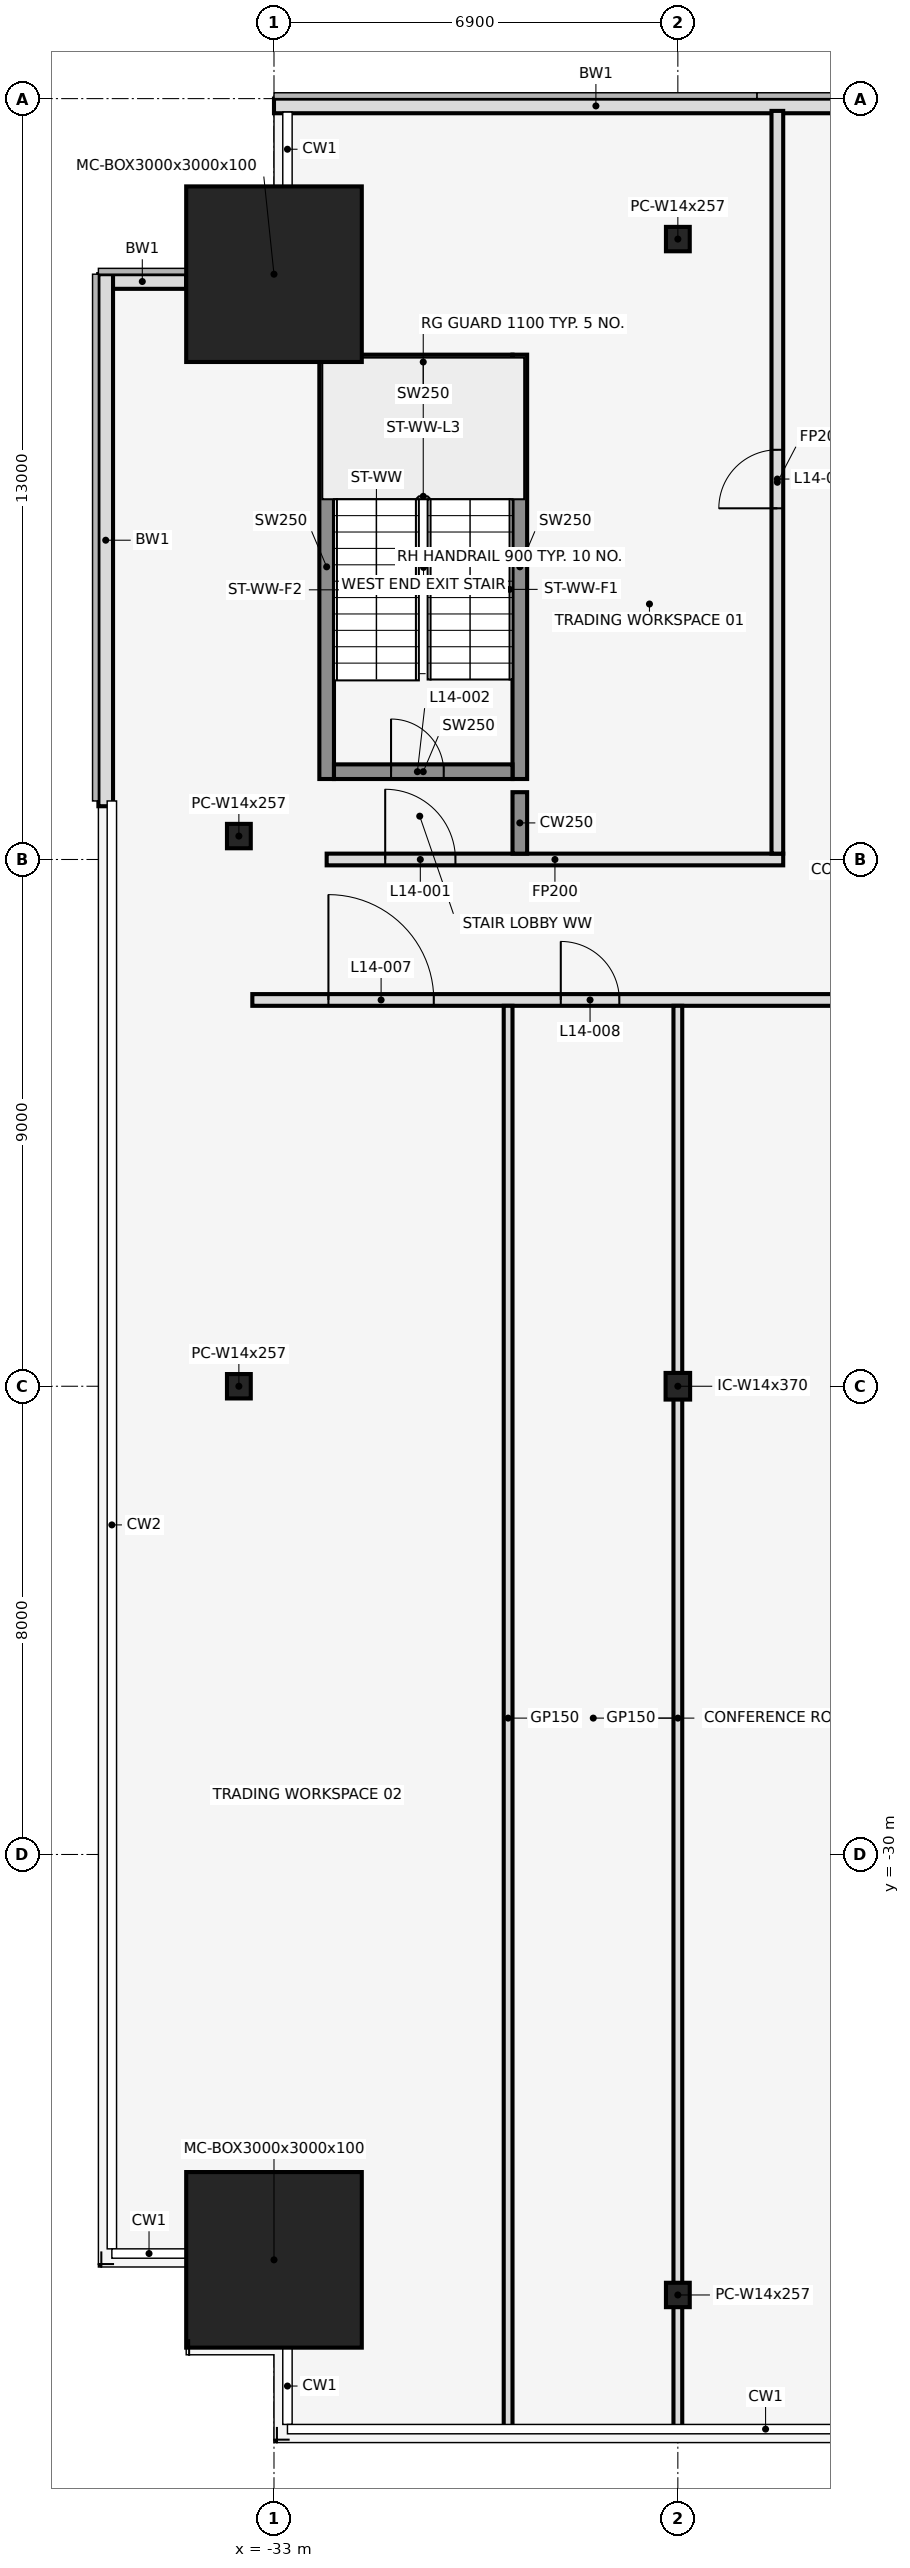
"""IFC4 building model, lengths in metres.
Left out: names, types, materials, properties, quantities, classifications, styles, units other than length and angle.
Written with IfcOpenShell. Run it as: python <this file> out.ifc"""

import sys

from ifc_helpers import new_model, si_unit, direction, frame, frame_2d, origin, origin_2d, place, context, subcontext, project, spatial, rectangle, hollow_rectangle, i_section, extrude, element, fill, save


model = new_model("IFC4")
c1 = context("Model", 3, precision=1e-05, world=origin(), true_north=direction((0.0, 1.0)))
c2 = subcontext(c1, "Body", "Model", "MODEL_VIEW")
j1 = project(units=[si_unit("LENGTHUNIT", "METRE"), si_unit("PLANEANGLEUNIT", "RADIAN")], contexts=[c1])
p1 = place(None, origin())
s1 = spatial("IfcSite", under=j1, at=p1, CompositionType="ELEMENT")
p2 = place(p1, origin())
s2 = spatial("IfcBuilding", under=s1, at=p2, CompositionType="ELEMENT")
p3 = place(p2, frame((0.0, 0.0, 71.0)))
s3 = spatial("IfcBuildingStorey", under=s2, at=p3, CompositionType="ELEMENT", Elevation=71.0)
for number, where, z_axis, x_axis in (
    (1, (-33.0, -36.926, 0.0), (0.0, 0.0, 1.0), (1.0, 0.0, 0.0)),
    (2, (-33.0, -3.0, 0.0), (0.0, 0.0, 1.0), (1.0, 0.0, 0.0)),
):
    element("IfcColumn", number, at=place(p3, frame(where, z_axis=z_axis, x_axis=x_axis)), inside=s3, PredefinedType="COLUMN", context=c2, shape_type="SweptSolid", body=[
        extrude(hollow_rectangle(XDim=3.0, YDim=3.0, WallThickness=0.1, at=origin_2d()), origin(), (0.0, 0.0, 1.0), 4.5),
    ])
for number, where, z_axis, x_axis in (
    (3, (-26.1, -37.526, 0.0), (0.0, 0.0, 1.0), (1.0, 0.0, 0.0)),
    (4, (-26.1, -2.4, 0.0), (0.0, 0.0, 1.0), (1.0, 0.0, 0.0)),
    (5, (-33.6, -12.6, 0.0), (0.0, 0.0, 1.0), (1.0, 0.0, 0.0)),
    (6, (-33.6, -22.0, 0.0), (0.0, 0.0, 1.0), (1.0, 0.0, 0.0)),
):
    element("IfcColumn", number, at=place(p3, frame(where, z_axis=z_axis, x_axis=x_axis)), inside=s3, PredefinedType="COLUMN", context=c2, shape_type="SweptSolid", body=[
        extrude(i_section(OverallWidth=0.406, OverallDepth=0.417, WebThickness=0.03, FlangeThickness=0.048, at=origin_2d()), origin(), (0.0, 0.0, 1.0), 4.5),
    ])
p4 = place(p3, frame((-26.1, -22.0, 0.0), z_axis=(0.0, 0.0, 1.0), x_axis=(1.0, 0.0, 0.0)))
e7 = element("IfcColumn", 7, at=p4, inside=s3, PredefinedType="COLUMN", context=c2, shape_type="SweptSolid", body=[
    extrude(i_section(OverallWidth=0.419, OverallDepth=0.455, WebThickness=0.042, FlangeThickness=0.068, at=origin_2d()), origin(), (0.0, 0.0, 1.0), 4.5),
])
p5 = place(p3, frame((-22.0, -0.125, 0.0), z_axis=(0.0, 0.0, 1.0), x_axis=(-1.0, 0.0, 0.0)))
e8 = element("IfcWall", 8, at=p5, inside=s3, PredefinedType="STANDARD", context=c2, shape_type="SweptSolid", body=[
    extrude(rectangle(XDim=11.0, YDim=0.25, at=frame_2d((5.5, 0.0))), origin(), (0.0, 0.0, 1.0), 4.35),
])
p6 = place(p3, frame((-34.5, -3.125, 0.0), z_axis=(0.0, 0.0, 1.0), x_axis=(-1.0, 0.0, 0.0)))
e9 = element("IfcWall", 9, at=p6, inside=s3, PredefinedType="STANDARD", context=c2, shape_type="SweptSolid", body=[
    extrude(rectangle(XDim=1.5, YDim=0.25, at=frame_2d((0.75, 0.0))), origin(), (0.0, 0.0, 1.0), 4.35),
])
p7 = place(p3, frame((-35.875, -3.0, 0.0), z_axis=(0.0, 0.0, 1.0), x_axis=(0.0, -1.0, 0.0)))
e10 = element("IfcWall", 10, at=p7, inside=s3, PredefinedType="STANDARD", context=c2, shape_type="SweptSolid", body=[
    extrude(rectangle(XDim=9.09, YDim=0.25, at=frame_2d((4.545, 0.0))), origin(), (0.0, 0.0, 1.0), 4.35),
])
for number, where, z_axis, x_axis in (
    (11, (-32.1, -11.625, 0.0), (0.0, 0.0, 1.0), (0.0, 1.0, 0.0)),
    (12, (-28.8, -11.625, 0.0), (0.0, 0.0, 1.0), (0.0, 1.0, 0.0)),
):
    element("IfcWall", number, at=place(p3, frame(where, z_axis=z_axis, x_axis=x_axis)), inside=s3, PredefinedType="SHEAR", context=c2, shape_type="SweptSolid", body=[
        extrude(rectangle(XDim=7.25, YDim=0.25, at=frame_2d((3.625, 0.0))), origin(), (0.0, 0.0, 1.0), 4.5),
    ])
p8 = place(p3, frame((-31.975, -11.5, 0.0), z_axis=(0.0, 0.0, 1.0), x_axis=(1.0, 0.0, 0.0)))
e13 = element("IfcWall", 13, at=p8, inside=s3, PredefinedType="SHEAR", context=c2, shape_type="SweptSolid", body=[
    extrude(rectangle(XDim=3.05, YDim=0.25, at=frame_2d((1.525, 0.0))), origin(), (0.0, 0.0, 1.0), 4.5),
])
p9 = place(p8, frame((0.975, 0.0, 0.0)))
e14 = element("IfcOpeningElement", 14, at=p9, cuts=e13, PredefinedType="OPENING", context=c2, shape_type="SweptSolid", body=[
    extrude(rectangle(XDim=0.9, YDim=2.1, at=frame_2d((0.45, 1.05))), frame((0.0, 0.137, 0.0), z_axis=(0.0, -1.0, 0.0), x_axis=(1.0, 0.0, 0.0)), (0.0, 0.0, 1.0), 0.274),
])
p10 = place(p3, frame((-31.975, -4.5, 0.0), z_axis=(0.0, 0.0, 1.0), x_axis=(1.0, 0.0, 0.0)))
e15 = element("IfcWall", 15, at=p10, inside=s3, PredefinedType="SHEAR", context=c2, shape_type="SweptSolid", body=[
    extrude(rectangle(XDim=3.05, YDim=0.25, at=frame_2d((1.525, 0.0))), origin(), (0.0, 0.0, 1.0), 4.5),
])
p11 = place(p3, frame((-33.37, -15.4, 0.0), z_axis=(0.0, 0.0, 1.0), x_axis=(1.0, 0.0, 0.0)))
e16 = element("IfcWall", 16, at=p11, inside=s3, PredefinedType="PARTITIONING", context=c2, shape_type="SweptSolid", body=[
    extrude(rectangle(XDim=66.74, YDim=0.2, at=frame_2d((33.37, 0.0))), origin(), (0.0, 0.0, 1.0), 3.418),
])
p12 = place(p11, frame((1.3, 0.0, 0.0)))
e17 = element("IfcOpeningElement", 17, at=p12, cuts=e16, PredefinedType="OPENING", context=c2, shape_type="SweptSolid", body=[
    extrude(rectangle(XDim=1.8, YDim=2.1, at=frame_2d((0.9, 1.05))), frame((0.0, 0.112, 0.0), z_axis=(0.0, -1.0, 0.0), x_axis=(1.0, 0.0, 0.0)), (0.0, 0.0, 1.0), 0.224),
])
p13 = place(p11, frame((5.27, 0.0, 0.0)))
e18 = element("IfcOpeningElement", 18, at=p13, cuts=e16, PredefinedType="OPENING", context=c2, shape_type="SweptSolid", body=[
    extrude(rectangle(XDim=1.0, YDim=2.1, at=frame_2d((0.5, 1.05))), frame((0.0, 0.112, 0.0), z_axis=(0.0, -1.0, 0.0), x_axis=(1.0, 0.0, 0.0)), (0.0, 0.0, 1.0), 0.224),
])
p14 = place(p11, frame((10.77, 0.0, 0.0)))
e19 = element("IfcOpeningElement", 19, at=p14, cuts=e16, PredefinedType="OPENING", context=c2, shape_type="SweptSolid", body=[
    extrude(rectangle(XDim=1.8, YDim=2.1, at=frame_2d((0.9, 1.05))), frame((0.0, 0.112, 0.0), z_axis=(0.0, -1.0, 0.0), x_axis=(1.0, 0.0, 0.0)), (0.0, 0.0, 1.0), 0.224),
])
p15 = place(p11, frame((16.87, 0.0, 0.0)))
e20 = element("IfcOpeningElement", 20, at=p15, cuts=e16, PredefinedType="OPENING", context=c2, shape_type="SweptSolid", body=[
    extrude(rectangle(XDim=1.0, YDim=2.1, at=frame_2d((0.5, 1.05))), frame((0.0, 0.112, 0.0), z_axis=(0.0, -1.0, 0.0), x_axis=(1.0, 0.0, 0.0)), (0.0, 0.0, 1.0), 0.224),
])
p16 = place(p11, frame((22.27, 0.0, 0.0)))
e21 = element("IfcOpeningElement", 21, at=p16, cuts=e16, PredefinedType="OPENING", context=c2, shape_type="SweptSolid", body=[
    extrude(rectangle(XDim=1.8, YDim=2.1, at=frame_2d((0.9, 1.05))), frame((0.0, 0.112, 0.0), z_axis=(0.0, -1.0, 0.0), x_axis=(1.0, 0.0, 0.0)), (0.0, 0.0, 1.0), 0.224),
])
p17 = place(p11, frame((33.87, 0.0, 0.0)))
e22 = element("IfcOpeningElement", 22, at=p17, cuts=e16, PredefinedType="OPENING", context=c2, shape_type="SweptSolid", body=[
    extrude(rectangle(XDim=1.8, YDim=2.1, at=frame_2d((0.9, 1.05))), frame((0.0, 0.112, 0.0), z_axis=(0.0, -1.0, 0.0), x_axis=(1.0, 0.0, 0.0)), (0.0, 0.0, 1.0), 0.224),
])
p18 = place(p11, frame((45.97, 0.0, 0.0)))
e23 = element("IfcOpeningElement", 23, at=p18, cuts=e16, PredefinedType="OPENING", context=c2, shape_type="SweptSolid", body=[
    extrude(rectangle(XDim=0.9, YDim=2.1, at=frame_2d((0.45, 1.05))), frame((0.0, 0.112, 0.0), z_axis=(0.0, -1.0, 0.0), x_axis=(1.0, 0.0, 0.0)), (0.0, 0.0, 1.0), 0.224),
])
p19 = place(p11, frame((55.67, 0.0, 0.0)))
e24 = element("IfcOpeningElement", 24, at=p19, cuts=e16, PredefinedType="OPENING", context=c2, shape_type="SweptSolid", body=[
    extrude(rectangle(XDim=1.8, YDim=2.1, at=frame_2d((0.9, 1.05))), frame((0.0, 0.112, 0.0), z_axis=(0.0, -1.0, 0.0), x_axis=(1.0, 0.0, 0.0)), (0.0, 0.0, 1.0), 0.224),
])
p20 = place(p11, frame((63.57, 0.0, 0.0)))
e25 = element("IfcOpeningElement", 25, at=p20, cuts=e16, PredefinedType="OPENING", context=c2, shape_type="SweptSolid", body=[
    extrude(rectangle(XDim=1.8, YDim=2.1, at=frame_2d((0.9, 1.05))), frame((0.0, 0.112, 0.0), z_axis=(0.0, -1.0, 0.0), x_axis=(1.0, 0.0, 0.0)), (0.0, 0.0, 1.0), 0.224),
])
p21 = place(p3, frame((-32.1, -13.0, 0.0), z_axis=(0.0, 0.0, 1.0), x_axis=(1.0, 0.0, 0.0)))
e26 = element("IfcWall", 26, at=p21, inside=s3, PredefinedType="PARTITIONING", context=c2, shape_type="SweptSolid", body=[
    extrude(rectangle(XDim=7.8, YDim=0.2, at=frame_2d((3.9, 0.0))), origin(), (0.0, 0.0, 1.0), 3.418),
])
p22 = place(p21, frame((1.0, 0.0, 0.0)))
e27 = element("IfcOpeningElement", 27, at=p22, cuts=e26, PredefinedType="OPENING", context=c2, shape_type="SweptSolid", body=[
    extrude(rectangle(XDim=1.2, YDim=2.1, at=frame_2d((0.6, 1.05))), frame((0.0, 0.112, 0.0), z_axis=(0.0, -1.0, 0.0), x_axis=(1.0, 0.0, 0.0)), (0.0, 0.0, 1.0), 0.224),
])
p23 = place(p3, frame((-29.0, -39.84, 0.0), z_axis=(0.0, 0.0, 1.0), x_axis=(0.0, 1.0, 0.0)))
e28 = element("IfcWall", 28, at=p23, inside=s3, PredefinedType="PARTITIONING", context=c2, shape_type="SweptSolid", body=[
    extrude(rectangle(XDim=24.34, YDim=0.15, at=frame_2d((12.17, 0.0))), origin(), (0.0, 0.0, 1.0), 3.418),
])
p24 = place(p3, frame((-28.8, -12.9, 0.0), z_axis=(0.0, 0.0, 1.0), x_axis=(0.0, 1.0, 0.0)))
e29 = element("IfcWall", 29, at=p24, inside=s3, PredefinedType="SHEAR", context=c2, shape_type="SweptSolid", body=[
    extrude(rectangle(XDim=1.05, YDim=0.25, at=frame_2d((0.525, 0.0))), origin(), (0.0, 0.0, 1.0), 4.5),
])
p25 = place(p3, frame((-26.1, -39.84, 0.0), z_axis=(0.0, 0.0, 1.0), x_axis=(0.0, 1.0, 0.0)))
e30 = element("IfcWall", 30, at=p25, inside=s3, PredefinedType="PARTITIONING", context=c2, shape_type="SweptSolid", body=[
    extrude(rectangle(XDim=24.34, YDim=0.15, at=frame_2d((12.17, 0.0))), origin(), (0.0, 0.0, 1.0), 3.418),
])
p26 = place(p3, frame((-24.4, -12.9, 0.0), z_axis=(0.0, 0.0, 1.0), x_axis=(0.0, 1.0, 0.0)))
e31 = element("IfcWall", 31, at=p26, inside=s3, PredefinedType="PARTITIONING", context=c2, shape_type="SweptSolid", body=[
    extrude(rectangle(XDim=12.69, YDim=0.2, at=frame_2d((6.345, 0.0))), origin(), (0.0, 0.0, 1.0), 3.418),
])
p27 = place(p26, frame((5.9, 0.0, 0.0)))
e32 = element("IfcOpeningElement", 32, at=p27, cuts=e31, PredefinedType="OPENING", context=c2, shape_type="SweptSolid", body=[
    extrude(rectangle(XDim=1.0, YDim=2.1, at=frame_2d((0.5, 1.05))), frame((0.0, 0.112, 0.0), z_axis=(0.0, -1.0, 0.0), x_axis=(1.0, 0.0, 0.0)), (0.0, 0.0, 1.0), 0.224),
])
p28 = place(p22, origin())
e33 = element("IfcDoor", 33, at=p28, inside=s3, OperationType="SINGLE_SWING_LEFT", PredefinedType="DOOR", context=c2, shape_type="SweptSolid", body=[
    extrude(rectangle(XDim=1.2, YDim=2.1, at=frame_2d((0.6, 1.05))), frame((0.0, 0.025, 0.0), z_axis=(0.0, -1.0, 0.0), x_axis=(1.0, 0.0, 0.0)), (0.0, 0.0, 1.0), 0.05),
])
fill(e27, e33)
p29 = place(p9, origin())
e34 = element("IfcDoor", 34, at=p29, inside=s3, OperationType="SINGLE_SWING_LEFT", PredefinedType="DOOR", context=c2, shape_type="SweptSolid", body=[
    extrude(rectangle(XDim=0.9, YDim=2.1, at=frame_2d((0.45, 1.05))), frame((0.0, 0.025, 0.0), z_axis=(0.0, -1.0, 0.0), x_axis=(1.0, 0.0, 0.0)), (0.0, 0.0, 1.0), 0.05),
])
fill(e14, e34)
p30 = place(p27, origin())
e35 = element("IfcDoor", 35, at=p30, inside=s3, OperationType="SINGLE_SWING_LEFT", PredefinedType="DOOR", context=c2, shape_type="SweptSolid", body=[
    extrude(rectangle(XDim=1.0, YDim=2.1, at=frame_2d((0.5, 1.05))), frame((0.0, 0.025, 0.0), z_axis=(0.0, -1.0, 0.0), x_axis=(1.0, 0.0, 0.0)), (0.0, 0.0, 1.0), 0.05),
])
fill(e32, e35)
p31 = place(p12, origin())
e36 = element("IfcDoor", 36, at=p31, inside=s3, OperationType="SINGLE_SWING_LEFT", PredefinedType="DOOR", context=c2, shape_type="SweptSolid", body=[
    extrude(rectangle(XDim=1.8, YDim=2.1, at=frame_2d((0.9, 1.05))), frame((0.0, 0.025, 0.0), z_axis=(0.0, -1.0, 0.0), x_axis=(1.0, 0.0, 0.0)), (0.0, 0.0, 1.0), 0.05),
])
fill(e17, e36)
p32 = place(p13, frame((1.0, 0.0, 0.0), z_axis=(0.0, 0.0, 1.0), x_axis=(-1.0, 0.0, 0.0)))
e37 = element("IfcDoor", 37, at=p32, inside=s3, OperationType="SINGLE_SWING_RIGHT", PredefinedType="DOOR", context=c2, shape_type="SweptSolid", body=[
    extrude(rectangle(XDim=1.0, YDim=2.1, at=frame_2d((0.5, 1.05))), frame((0.0, 0.025, 0.0), z_axis=(0.0, -1.0, 0.0), x_axis=(1.0, 0.0, 0.0)), (0.0, 0.0, 1.0), 0.05),
])
fill(e18, e37)
save(model, sys.argv[1])
